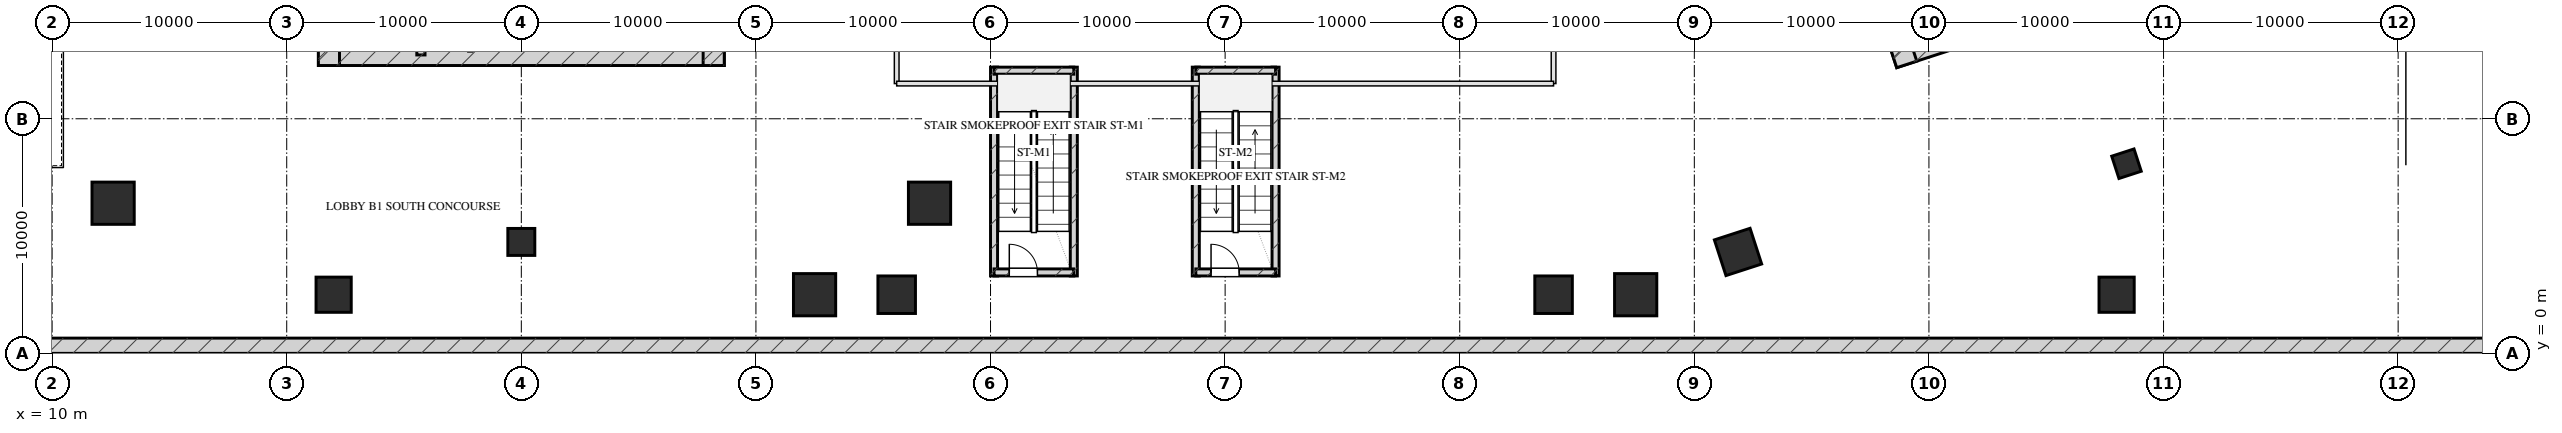
"""IFC4 building model, lengths in metres.
Left out: names, types, materials, properties, quantities, classifications, styles, units other than length and angle.
Written with IfcOpenShell. Run it as: python <this file> out.ifc"""

import sys

from ifc_helpers import new_model, si_unit, direction, frame, frame_2d, origin, origin_2d, place, context, subcontext, project, spatial, rectangle, hollow_rectangle, extrude, element, fill, save


model = new_model("IFC4")
c1 = context("Model", 3, precision=1e-05, world=origin(), true_north=direction((0.0, 1.0)))
c2 = subcontext(c1, "Body", "Model", "MODEL_VIEW")
j1 = project(units=[si_unit("LENGTHUNIT", "METRE"), si_unit("PLANEANGLEUNIT", "RADIAN")], contexts=[c1])
p1 = place(None, origin())
s1 = spatial("IfcSite", under=j1, at=p1, CompositionType="ELEMENT")
p2 = place(p1, origin())
s2 = spatial("IfcBuilding", under=s1, at=p2, CompositionType="ELEMENT")
p3 = place(p2, frame((0.0, 0.0, -6.0)))
s3 = spatial("IfcBuildingStorey", under=s2, at=p3, CompositionType="ELEMENT", Elevation=-6.0)
p4 = place(p3, frame((21.35, 12.72, 0.0), z_axis=(0.0, 0.0, 1.0), x_axis=(1.0, 0.0, 0.0)))
e1 = element("IfcWall", 1, at=p4, inside=s3, PredefinedType="SHEAR", context=c2, shape_type="SweptSolid", body=[
    extrude(rectangle(XDim=17.3, YDim=0.9, at=frame_2d((8.65, 0.0))), origin(), (0.0, 0.0, 1.0), 6.0),
])
for number, where, z_axis, x_axis in (
    (2, (21.8, 22.05, 0.0), (0.0, 0.0, 1.0), (0.0, -1.0, 0.0)),
    (3, (38.2, 22.05, 0.0), (0.0, 0.0, 1.0), (0.0, -1.0, 0.0)),
):
    element("IfcWall", number, at=place(p3, frame(where, z_axis=z_axis, x_axis=x_axis)), inside=s3, PredefinedType="SHEAR", context=c2, shape_type="SweptSolid", body=[
        extrude(rectangle(XDim=9.78, YDim=0.9, at=frame_2d((4.89, 0.0))), origin(), (0.0, 0.0, 1.0), 6.0),
    ])
p5 = place(p3, frame((25.72, 19.7, 0.0), z_axis=(0.0, 0.0, 1.0), x_axis=(0.0, -1.0, 0.0)))
e4 = element("IfcWall", 4, at=p5, inside=s3, PredefinedType="SHEAR", context=c2, shape_type="SweptSolid", body=[
    extrude(rectangle(XDim=6.98, YDim=0.35, at=frame_2d((3.49, 0.0))), origin(), (0.0, 0.0, 1.0), 6.0),
])
p6 = place(p3, frame((88.487, 12.605, 0.0), z_axis=(0.0, 0.0, 1.0), x_axis=(0.951055016115, 0.309021611416, 0.0)))
e5 = element("IfcWall", 5, at=p6, inside=s3, PredefinedType="SHEAR", context=c2, shape_type="SweptSolid", body=[
    extrude(rectangle(XDim=16.7, YDim=0.9, at=frame_2d((8.35, 0.0))), origin(), (0.0, 0.0, 1.0), 6.0),
])
p7 = place(p3, frame((86.032, 21.618, 0.0), z_axis=(0.0, 0.0, 1.0), x_axis=(0.30901438634, -0.951057363693, 0.0)))
e6 = element("IfcWall", 6, at=p7, inside=s3, PredefinedType="SHEAR", context=c2, shape_type="SweptSolid", body=[
    extrude(rectangle(XDim=9.78, YDim=0.9, at=frame_2d((4.89, 0.0))), origin(), (0.0, 0.0, 1.0), 6.0),
])
for number, where, z_axis, x_axis in (
    (7, (50.15, 3.3, 0.0), (0.0, 0.0, 1.0), (0.0, 1.0, 0.0)),
    (8, (53.55, 3.3, 0.0), (0.0, 0.0, 1.0), (0.0, 1.0, 0.0)),
):
    element("IfcWall", number, at=place(p3, frame(where, z_axis=z_axis, x_axis=x_axis)), inside=s3, PredefinedType="SHEAR", context=c2, shape_type="SweptSolid", body=[
        extrude(rectangle(XDim=8.9, YDim=0.3, at=frame_2d((4.45, 0.0))), origin(), (0.0, 0.0, 1.0), 6.0),
    ])
p8 = place(p3, frame((50.15, 12.05, 0.0), z_axis=(0.0, 0.0, 1.0), x_axis=(1.0, 0.0, 0.0)))
e9 = element("IfcWall", 9, at=p8, inside=s3, PredefinedType="SHEAR", context=c2, shape_type="SweptSolid", body=[
    extrude(rectangle(XDim=3.4, YDim=0.3, at=frame_2d((1.7, 0.0))), origin(), (0.0, 0.0, 1.0), 6.0),
])
p9 = place(p3, frame((50.15, 3.45, 0.0), z_axis=(0.0, 0.0, 1.0), x_axis=(1.0, 0.0, 0.0)))
e10 = element("IfcWall", 10, at=p9, inside=s3, PredefinedType="SHEAR", context=c2, shape_type="SweptSolid", body=[
    extrude(rectangle(XDim=3.4, YDim=0.3, at=frame_2d((1.7, 0.0))), origin(), (0.0, 0.0, 1.0), 6.0),
])
p10 = place(p9, frame((0.65, 0.0, 0.0)))
e11 = element("IfcOpeningElement", 11, at=p10, cuts=e10, PredefinedType="OPENING", context=c2, shape_type="SweptSolid", body=[
    extrude(rectangle(XDim=1.2, YDim=2.05, at=frame_2d((0.6, 1.025))), frame((0.0, 0.16, 0.0), z_axis=(0.0, -1.0, 0.0), x_axis=(1.0, 0.0, 0.0)), (0.0, 0.0, 1.0), 0.32),
])
for number, where, z_axis, x_axis in (
    (12, (58.75, 3.3, 0.0), (0.0, 0.0, 1.0), (0.0, 1.0, 0.0)),
    (13, (62.15, 3.3, 0.0), (0.0, 0.0, 1.0), (0.0, 1.0, 0.0)),
):
    element("IfcWall", number, at=place(p3, frame(where, z_axis=z_axis, x_axis=x_axis)), inside=s3, PredefinedType="SHEAR", context=c2, shape_type="SweptSolid", body=[
        extrude(rectangle(XDim=8.9, YDim=0.3, at=frame_2d((4.45, 0.0))), origin(), (0.0, 0.0, 1.0), 6.0),
    ])
p11 = place(p3, frame((58.75, 12.05, 0.0), z_axis=(0.0, 0.0, 1.0), x_axis=(1.0, 0.0, 0.0)))
e14 = element("IfcWall", 14, at=p11, inside=s3, PredefinedType="SHEAR", context=c2, shape_type="SweptSolid", body=[
    extrude(rectangle(XDim=3.4, YDim=0.3, at=frame_2d((1.7, 0.0))), origin(), (0.0, 0.0, 1.0), 6.0),
])
p12 = place(p3, frame((58.75, 3.45, 0.0), z_axis=(0.0, 0.0, 1.0), x_axis=(1.0, 0.0, 0.0)))
e15 = element("IfcWall", 15, at=p12, inside=s3, PredefinedType="SHEAR", context=c2, shape_type="SweptSolid", body=[
    extrude(rectangle(XDim=3.4, YDim=0.3, at=frame_2d((1.7, 0.0))), origin(), (0.0, 0.0, 1.0), 6.0),
])
p13 = place(p12, frame((0.65, 0.0, 0.0)))
e16 = element("IfcOpeningElement", 16, at=p13, cuts=e15, PredefinedType="OPENING", context=c2, shape_type="SweptSolid", body=[
    extrude(rectangle(XDim=1.2, YDim=2.05, at=frame_2d((0.6, 1.025))), frame((0.0, 0.16, 0.0), z_axis=(0.0, -1.0, 0.0), x_axis=(1.0, 0.0, 0.0)), (0.0, 0.0, 1.0), 0.32),
])
p14 = place(p3, frame((0.325, 0.325, 0.0), z_axis=(0.0, 0.0, 1.0), x_axis=(1.0, 0.0, 0.0)))
e17 = element("IfcWall", 17, at=p14, inside=s3, PredefinedType="SHEAR", context=c2, shape_type="SweptSolid", body=[
    extrude(rectangle(XDim=119.35, YDim=0.65, at=frame_2d((59.675, 0.0))), origin(), (0.0, 0.0, 1.0), 6.0),
])
p15 = place(p3, frame((22.0, 2.5, 0.0), z_axis=(0.0, 0.0, 1.0), x_axis=(1.0, 0.0, 0.0)))
e18 = element("IfcColumn", 18, at=p15, inside=s3, PredefinedType="COLUMN", context=c2, shape_type="SweptSolid", body=[
    extrude(rectangle(XDim=1.5, YDim=1.5, at=origin_2d()), origin(), (0.0, 0.0, 1.0), 6.001),
])
for number, where, z_axis, x_axis in (
    (19, (42.5, 2.5, 0.0), (0.0, 0.0, 1.0), (1.0, 0.0, 0.0)),
    (20, (77.5, 2.5, 0.0), (0.0, 0.0, 1.0), (1.0, 0.0, 0.0)),
):
    element("IfcColumn", number, at=place(p3, frame(where, z_axis=z_axis, x_axis=x_axis)), inside=s3, PredefinedType="COLUMN", context=c2, shape_type="SweptSolid", body=[
        extrude(hollow_rectangle(XDim=1.8, YDim=1.8, WallThickness=0.06, at=origin_2d()), origin(), (0.0, 0.0, 1.0), 6.001),
    ])
p16 = place(p3, frame((98.0, 2.5, 0.0), z_axis=(0.0, 0.0, 1.0), x_axis=(1.0, 0.0, 0.0)))
e21 = element("IfcColumn", 21, at=p16, inside=s3, PredefinedType="COLUMN", context=c2, shape_type="SweptSolid", body=[
    extrude(rectangle(XDim=1.5, YDim=1.5, at=origin_2d()), origin(), (0.0, 0.0, 1.0), 6.001),
])
for number, where, z_axis, x_axis in (
    (22, (46.0, 2.5, 0.0), (0.0, 0.0, 1.0), (1.0, 0.0, 0.0)),
    (23, (74.0, 2.5, 0.0), (0.0, 0.0, 1.0), (1.0, 0.0, 0.0)),
):
    element("IfcColumn", number, at=place(p3, frame(where, z_axis=z_axis, x_axis=x_axis)), inside=s3, PredefinedType="COLUMN", context=c2, shape_type="SweptSolid", body=[
        extrude(hollow_rectangle(XDim=1.6, YDim=1.6, WallThickness=0.055, at=origin_2d()), origin(), (0.0, 0.0, 1.0), 6.001),
    ])
for number, where, z_axis, x_axis in (
    (24, (12.6, 6.4, 0.0), (0.0, 0.0, 1.0), (1.0, 0.0, 0.0)),
    (25, (47.4, 6.4, 0.0), (0.0, 0.0, 1.0), (1.0, 0.0, 0.0)),
):
    element("IfcColumn", number, at=place(p3, frame(where, z_axis=z_axis, x_axis=x_axis)), inside=s3, PredefinedType="COLUMN", context=c2, shape_type="SweptSolid", body=[
        extrude(hollow_rectangle(XDim=1.8, YDim=1.8, WallThickness=0.06, at=origin_2d()), origin(), (0.0, 0.0, 1.0), 6.001),
    ])
p17 = place(p3, frame((30.0, 4.75, 0.0), z_axis=(0.0, 0.0, 1.0), x_axis=(1.0, 0.0, 0.0)))
e26 = element("IfcColumn", 26, at=p17, inside=s3, PredefinedType="COLUMN", context=c2, shape_type="SweptSolid", body=[
    extrude(hollow_rectangle(XDim=1.15, YDim=1.15, WallThickness=0.04, at=origin_2d()), origin(), (0.0, 0.0, 1.0), 6.001),
])
p18 = place(p3, frame((81.863, 4.323, 0.0), z_axis=(0.0, 0.0, 1.0), x_axis=(0.951056516295, 0.309016994375, 0.0)))
e27 = element("IfcColumn", 27, at=p18, inside=s3, PredefinedType="COLUMN", context=c2, shape_type="SweptSolid", body=[
    extrude(hollow_rectangle(XDim=1.6, YDim=1.6, WallThickness=0.055, at=origin_2d()), origin(), (0.0, 0.0, 1.0), 6.001),
])
p19 = place(p3, frame((98.421, 8.084, 0.0), z_axis=(0.0, 0.0, 1.0), x_axis=(0.951056516295, 0.309016994375, 0.0)))
e28 = element("IfcColumn", 28, at=p19, inside=s3, PredefinedType="COLUMN", context=c2, shape_type="SweptSolid", body=[
    extrude(hollow_rectangle(XDim=1.0, YDim=1.0, WallThickness=0.036, at=origin_2d()), origin(), (0.0, 0.0, 1.0), 6.001),
])
p20 = place(p3, frame((27.82, 16.55, 0.0), z_axis=(0.0, 0.0, 1.0), x_axis=(0.0, -1.0, 0.0)))
e29 = element("IfcWall", 29, at=p20, inside=s3, PredefinedType="PARTITIONING", context=c2, shape_type="SweptSolid", body=[
    extrude(rectangle(XDim=3.7, YDim=0.2, at=frame_2d((1.85, 0.0))), origin(), (0.0, 0.0, 1.0), 5.685),
])
p21 = place(p3, frame((46.0, 11.5, 0.0), z_axis=(0.0, 0.0, 1.0), x_axis=(0.0, 1.0, 0.0)))
e30 = element("IfcWall", 30, at=p21, inside=s3, PredefinedType="PARTITIONING", context=c2, shape_type="SweptSolid", body=[
    extrude(rectangle(XDim=45.0, YDim=0.2, at=frame_2d((22.5, 0.0))), origin(), (0.0, 0.0, 1.0), 5.685),
])
p22 = place(p21, frame((18.0, 0.0, 0.0)))
e31 = element("IfcOpeningElement", 31, at=p22, cuts=e30, PredefinedType="OPENING", context=c2, shape_type="SweptSolid", body=[
    extrude(rectangle(XDim=1.8, YDim=2.05, at=frame_2d((0.9, 1.025))), frame((0.0, 0.11, 0.0), z_axis=(0.0, -1.0, 0.0), x_axis=(1.0, 0.0, 0.0)), (0.0, 0.0, 1.0), 0.22),
])
p23 = place(p3, frame((74.0, 11.5, 0.0), z_axis=(0.0, 0.0, 1.0), x_axis=(0.0, 1.0, 0.0)))
e32 = element("IfcWall", 32, at=p23, inside=s3, PredefinedType="PARTITIONING", context=c2, shape_type="SweptSolid", body=[
    extrude(rectangle(XDim=45.0, YDim=0.2, at=frame_2d((22.5, 0.0))), origin(), (0.0, 0.0, 1.0), 5.685),
])
p24 = place(p23, frame((18.0, 0.0, 0.0)))
e33 = element("IfcOpeningElement", 33, at=p24, cuts=e32, PredefinedType="OPENING", context=c2, shape_type="SweptSolid", body=[
    extrude(rectangle(XDim=1.8, YDim=2.05, at=frame_2d((0.9, 1.025))), frame((0.0, 0.11, 0.0), z_axis=(0.0, -1.0, 0.0), x_axis=(1.0, 0.0, 0.0)), (0.0, 0.0, 1.0), 0.22),
])
p25 = place(p3, frame((46.0, 11.5, 0.0), z_axis=(0.0, 0.0, 1.0), x_axis=(1.0, 0.0, 0.0)))
e34 = element("IfcWall", 34, at=p25, inside=s3, PredefinedType="PARTITIONING", context=c2, shape_type="SweptSolid", body=[
    extrude(rectangle(XDim=28.0, YDim=0.2, at=frame_2d((14.0, 0.0))), origin(), (0.0, 0.0, 1.0), 5.685),
])
p26 = place(p10, origin())
e35 = element("IfcDoor", 35, at=p26, inside=s3, OperationType="SINGLE_SWING_LEFT", PredefinedType="DOOR", context=c2, shape_type="SweptSolid", body=[
    extrude(rectangle(XDim=1.2, YDim=2.05, at=frame_2d((0.6, 1.025))), frame((0.0, 0.025, 0.0), z_axis=(0.0, -1.0, 0.0), x_axis=(1.0, 0.0, 0.0)), (0.0, 0.0, 1.0), 0.05),
])
fill(e11, e35)
p27 = place(p13, origin())
e36 = element("IfcDoor", 36, at=p27, inside=s3, OperationType="SINGLE_SWING_LEFT", PredefinedType="DOOR", context=c2, shape_type="SweptSolid", body=[
    extrude(rectangle(XDim=1.2, YDim=2.05, at=frame_2d((0.6, 1.025))), frame((0.0, 0.025, 0.0), z_axis=(0.0, -1.0, 0.0), x_axis=(1.0, 0.0, 0.0)), (0.0, 0.0, 1.0), 0.05),
])
fill(e16, e36)
save(model, sys.argv[1])
